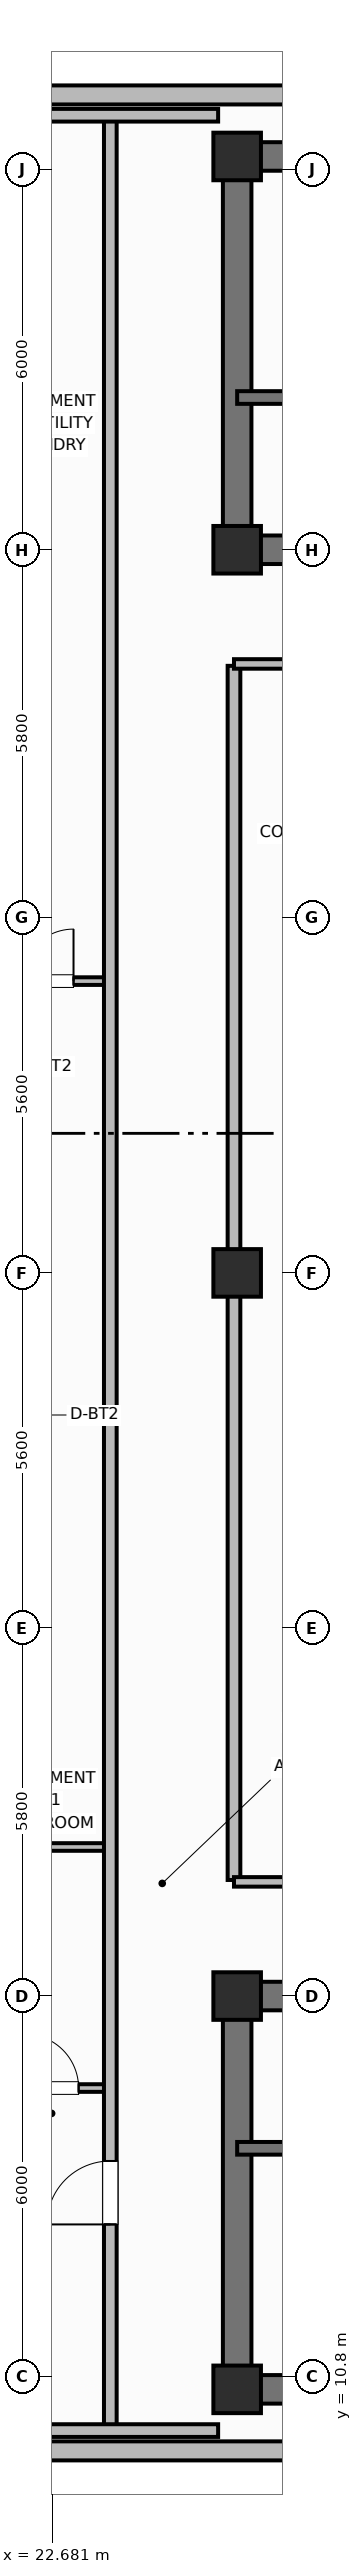
"""IFC4 building model, lengths in metres.
Left out: names, types, materials, properties, quantities, classifications, styles, units other than length and angle.
Written with IfcOpenShell. Run it as: python <this file> out.ifc"""

import sys

from ifc_helpers import new_model, si_unit, direction, frame, frame_2d, origin, origin_2d, place, context, subcontext, project, spatial, rectangle, extrude, element, fill, save


model = new_model("IFC4")
c1 = context("Model", 3, precision=1e-05, world=origin(), true_north=direction((0.0, 1.0)))
c2 = subcontext(c1, "Body", "Model", "MODEL_VIEW")
j1 = project(units=[si_unit("LENGTHUNIT", "METRE"), si_unit("PLANEANGLEUNIT", "RADIAN")], contexts=[c1])
p1 = place(None, origin())
s1 = spatial("IfcSite", under=j1, at=p1, CompositionType="ELEMENT")
p2 = place(p1, origin())
s2 = spatial("IfcBuilding", under=s1, at=p2, CompositionType="ELEMENT")
p3 = place(p2, frame((0.0, 0.0, 278.7)))
s3 = spatial("IfcBuildingStorey", under=s2, at=p3, CompositionType="ELEMENT", Elevation=278.7)
p4 = place(p3, frame((52.8, 10.6, 0.0), z_axis=(0.0, 0.0, 1.0), x_axis=(-1.0, 0.0, 0.0)))
e1 = element("IfcWall", 1, at=p4, inside=s3, PredefinedType="SHEAR", context=c2, shape_type="SweptSolid", body=[
    extrude(rectangle(XDim=27.2, YDim=0.45, at=frame_2d((13.6, 0.0))), origin(), (0.0, 0.0, 1.0), 3.7),
])
p5 = place(p3, frame((25.6, 10.825, 0.0), z_axis=(0.0, 0.0, 1.0), x_axis=(0.0, 1.0, 0.0)))
e2 = element("IfcWall", 2, at=p5, inside=s3, PredefinedType="SHEAR", context=c2, shape_type="SweptSolid", body=[
    extrude(rectangle(XDim=5.75, YDim=0.45, at=frame_2d((2.875, 0.0))), origin(), (0.0, 0.0, 1.0), 3.7),
])
p6 = place(p3, frame((25.6, 16.8, 0.0), z_axis=(0.0, 0.0, 1.0), x_axis=(1.0, 0.0, 0.0)))
e3 = element("IfcWall", 3, at=p6, inside=s3, PredefinedType="SHEAR", context=c2, shape_type="SweptSolid", body=[
    extrude(rectangle(XDim=27.2, YDim=0.45, at=frame_2d((13.6, 0.0))), origin(), (0.0, 0.0, 1.0), 3.7),
])
p7 = place(p6, frame((1.8, 0.0, 0.0)))
e4 = element("IfcOpeningElement", 4, at=p7, cuts=e3, PredefinedType="OPENING", context=c2, shape_type="SweptSolid", body=[
    extrude(rectangle(XDim=1.1, YDim=2.15, at=frame_2d((0.55, 1.075))), frame((0.0, 0.235, 0.0), z_axis=(0.0, -1.0, 0.0), x_axis=(1.0, 0.0, 0.0)), (0.0, 0.0, 1.0), 0.47),
])
p8 = place(p6, frame((5.6, 0.0, 0.0)))
e5 = element("IfcOpeningElement", 5, at=p8, cuts=e3, PredefinedType="OPENING", context=c2, shape_type="SweptSolid", body=[
    extrude(rectangle(XDim=0.85, YDim=2.1, at=frame_2d((0.425, 1.05))), frame((0.0, 0.235, 0.0), z_axis=(0.0, -1.0, 0.0), x_axis=(1.0, 0.0, 0.0)), (0.0, 0.0, 1.0), 0.47),
])
p9 = place(p6, frame((13.0, 0.0, 0.0)))
e6 = element("IfcOpeningElement", 6, at=p9, cuts=e3, PredefinedType="OPENING", context=c2, shape_type="SweptSolid", body=[
    extrude(rectangle(XDim=1.2, YDim=2.15, at=frame_2d((0.6, 1.075))), frame((0.0, 0.235, 0.0), z_axis=(0.0, -1.0, 0.0), x_axis=(1.0, 0.0, 0.0)), (0.0, 0.0, 1.0), 0.47),
])
p10 = place(p6, frame((19.2, 0.0, 0.0)))
e7 = element("IfcOpeningElement", 7, at=p10, cuts=e3, PredefinedType="OPENING", context=c2, shape_type="SweptSolid", body=[
    extrude(rectangle(XDim=0.85, YDim=2.1, at=frame_2d((0.425, 1.05))), frame((0.0, 0.235, 0.0), z_axis=(0.0, -1.0, 0.0), x_axis=(1.0, 0.0, 0.0)), (0.0, 0.0, 1.0), 0.47),
])
p11 = place(p6, frame((23.8, 0.0, 0.0)))
e8 = element("IfcOpeningElement", 8, at=p11, cuts=e3, PredefinedType="OPENING", context=c2, shape_type="SweptSolid", body=[
    extrude(rectangle(XDim=0.9, YDim=2.1, at=frame_2d((0.45, 1.05))), frame((0.0, 0.235, 0.0), z_axis=(0.0, -1.0, 0.0), x_axis=(1.0, 0.0, 0.0)), (0.0, 0.0, 1.0), 0.47),
])
p12 = place(p3, frame((25.6, 45.8, 0.0), z_axis=(0.0, 0.0, 1.0), x_axis=(1.0, 0.0, 0.0)))
e9 = element("IfcWall", 9, at=p12, inside=s3, PredefinedType="SHEAR", context=c2, shape_type="SweptSolid", body=[
    extrude(rectangle(XDim=27.2, YDim=0.45, at=frame_2d((13.6, 0.0))), origin(), (0.0, 0.0, 1.0), 3.7),
])
p13 = place(p3, frame((25.6, 39.825, 0.0), z_axis=(0.0, 0.0, 1.0), x_axis=(0.0, 1.0, 0.0)))
e10 = element("IfcWall", 10, at=p13, inside=s3, PredefinedType="SHEAR", context=c2, shape_type="SweptSolid", body=[
    extrude(rectangle(XDim=5.75, YDim=0.45, at=frame_2d((2.875, 0.0))), origin(), (0.0, 0.0, 1.0), 3.7),
])
p14 = place(p3, frame((52.8, 39.6, 0.0), z_axis=(0.0, 0.0, 1.0), x_axis=(-1.0, 0.0, 0.0)))
e11 = element("IfcWall", 11, at=p14, inside=s3, PredefinedType="SHEAR", context=c2, shape_type="SweptSolid", body=[
    extrude(rectangle(XDim=27.2, YDim=0.45, at=frame_2d((13.6, 0.0))), origin(), (0.0, 0.0, 1.0), 3.7),
])
p15 = place(p14, frame((24.2, 0.0, 0.0)))
e12 = element("IfcOpeningElement", 12, at=p15, cuts=e11, PredefinedType="OPENING", context=c2, shape_type="SweptSolid", body=[
    extrude(rectangle(XDim=1.1, YDim=2.15, at=frame_2d((0.55, 1.075))), frame((0.0, 0.235, 0.0), z_axis=(0.0, -1.0, 0.0), x_axis=(1.0, 0.0, 0.0)), (0.0, 0.0, 1.0), 0.47),
])
p16 = place(p14, frame((20.55, 0.0, 0.0)))
e13 = element("IfcOpeningElement", 13, at=p16, cuts=e11, PredefinedType="OPENING", context=c2, shape_type="SweptSolid", body=[
    extrude(rectangle(XDim=0.95, YDim=2.1, at=frame_2d((0.475, 1.05))), frame((0.0, 0.235, 0.0), z_axis=(0.0, -1.0, 0.0), x_axis=(1.0, 0.0, 0.0)), (0.0, 0.0, 1.0), 0.47),
])
p17 = place(p14, frame((15.1, 0.0, 0.0)))
e14 = element("IfcOpeningElement", 14, at=p17, cuts=e11, PredefinedType="OPENING", context=c2, shape_type="SweptSolid", body=[
    extrude(rectangle(XDim=1.2, YDim=2.15, at=frame_2d((0.6, 1.075))), frame((0.0, 0.235, 0.0), z_axis=(0.0, -1.0, 0.0), x_axis=(1.0, 0.0, 0.0)), (0.0, 0.0, 1.0), 0.47),
])
p18 = place(p14, frame((13.05, 0.0, 0.0)))
e15 = element("IfcOpeningElement", 15, at=p18, cuts=e11, PredefinedType="OPENING", context=c2, shape_type="SweptSolid", body=[
    extrude(rectangle(XDim=0.85, YDim=2.1, at=frame_2d((0.425, 1.05))), frame((0.0, 0.235, 0.0), z_axis=(0.0, -1.0, 0.0), x_axis=(1.0, 0.0, 0.0)), (0.0, 0.0, 1.0), 0.47),
])
p19 = place(p14, frame((11.0, 0.0, 0.0)))
e16 = element("IfcOpeningElement", 16, at=p19, cuts=e11, PredefinedType="OPENING", context=c2, shape_type="SweptSolid", body=[
    extrude(rectangle(XDim=0.85, YDim=2.1, at=frame_2d((0.425, 1.05))), frame((0.0, 0.235, 0.0), z_axis=(0.0, -1.0, 0.0), x_axis=(1.0, 0.0, 0.0)), (0.0, 0.0, 1.0), 0.47),
])
p20 = place(p14, frame((7.35, 0.0, 0.0)))
e17 = element("IfcOpeningElement", 17, at=p20, cuts=e11, PredefinedType="OPENING", context=c2, shape_type="SweptSolid", body=[
    extrude(rectangle(XDim=0.85, YDim=2.1, at=frame_2d((0.425, 1.05))), frame((0.0, 0.235, 0.0), z_axis=(0.0, -1.0, 0.0), x_axis=(1.0, 0.0, 0.0)), (0.0, 0.0, 1.0), 0.47),
])
p21 = place(p14, frame((4.2, 0.0, 0.0)))
e18 = element("IfcOpeningElement", 18, at=p21, cuts=e11, PredefinedType="OPENING", context=c2, shape_type="SweptSolid", body=[
    extrude(rectangle(XDim=1.3, YDim=2.2, at=frame_2d((0.65, 1.1))), frame((0.0, 0.235, 0.0), z_axis=(0.0, -1.0, 0.0), x_axis=(1.0, 0.0, 0.0)), (0.0, 0.0, 1.0), 0.47),
])
for number, where, z_axis, x_axis in (
    (19, (25.6, 10.6, 0.0), (0.0, 0.0, 1.0), (1.0, 0.0, 0.0)),
    (20, (25.6, 16.8, 0.0), (0.0, 0.0, 1.0), (1.0, 0.0, 0.0)),
    (21, (25.6, 39.6, 0.0), (0.0, 0.0, 1.0), (1.0, 0.0, 0.0)),
    (22, (25.6, 45.8, 0.0), (0.0, 0.0, 1.0), (1.0, 0.0, 0.0)),
    (23, (25.6, 28.2, 0.0), (0.0, 0.0, 1.0), (1.0, 0.0, 0.0)),
):
    element("IfcColumn", number, at=place(p3, frame(where, z_axis=z_axis, x_axis=x_axis)), inside=s3, PredefinedType="COLUMN", context=c2, shape_type="SweptSolid", body=[
        extrude(rectangle(XDim=0.75, YDim=0.75, at=origin_2d()), origin(), (0.0, 0.0, 1.0), 3.7),
    ])
p22 = place(p3, frame((22.56, 9.63, 0.0), z_axis=(0.0, 0.0, 1.0), x_axis=(1.0, 0.0, 0.0)))
e24 = element("IfcWall", 24, at=p22, inside=s3, PredefinedType="SOLIDWALL", context=c2, shape_type="SweptSolid", body=[
    extrude(rectangle(XDim=33.28, YDim=0.3, at=frame_2d((16.64, 0.0))), origin(), (0.0, 0.0, 1.0), 2.73),
])
p23 = place(p22, frame((5.08, 0.0, 0.76)))
e25 = element("IfcOpeningElement", 25, at=p23, cuts=e24, PredefinedType="OPENING", context=c2, shape_type="SweptSolid", body=[
    extrude(rectangle(XDim=1.8, YDim=1.85, at=frame_2d((0.9, 0.925))), frame((0.0, 0.16, 0.0), z_axis=(0.0, -1.0, 0.0), x_axis=(1.0, 0.0, 0.0)), (0.0, 0.0, 1.0), 0.32),
])
p24 = place(p22, frame((8.633, 0.0, 0.76)))
e26 = element("IfcOpeningElement", 26, at=p24, cuts=e24, PredefinedType="OPENING", context=c2, shape_type="SweptSolid", body=[
    extrude(rectangle(XDim=1.8, YDim=1.85, at=frame_2d((0.9, 0.925))), frame((0.0, 0.16, 0.0), z_axis=(0.0, -1.0, 0.0), x_axis=(1.0, 0.0, 0.0)), (0.0, 0.0, 1.0), 0.32),
])
p25 = place(p22, frame((15.74, 0.0, 0.76)))
e27 = element("IfcOpeningElement", 27, at=p25, cuts=e24, PredefinedType="OPENING", context=c2, shape_type="SweptSolid", body=[
    extrude(rectangle(XDim=1.8, YDim=1.85, at=frame_2d((0.9, 0.925))), frame((0.0, 0.16, 0.0), z_axis=(0.0, -1.0, 0.0), x_axis=(1.0, 0.0, 0.0)), (0.0, 0.0, 1.0), 0.32),
])
p26 = place(p22, frame((22.847, 0.0, 0.76)))
e28 = element("IfcOpeningElement", 28, at=p26, cuts=e24, PredefinedType="OPENING", context=c2, shape_type="SweptSolid", body=[
    extrude(rectangle(XDim=1.8, YDim=1.85, at=frame_2d((0.9, 0.925))), frame((0.0, 0.16, 0.0), z_axis=(0.0, -1.0, 0.0), x_axis=(1.0, 0.0, 0.0)), (0.0, 0.0, 1.0), 0.32),
])
p27 = place(p22, frame((26.4, 0.0, 0.76)))
e29 = element("IfcOpeningElement", 29, at=p27, cuts=e24, PredefinedType="OPENING", context=c2, shape_type="SweptSolid", body=[
    extrude(rectangle(XDim=1.8, YDim=1.85, at=frame_2d((0.9, 0.925))), frame((0.0, 0.16, 0.0), z_axis=(0.0, -1.0, 0.0), x_axis=(1.0, 0.0, 0.0)), (0.0, 0.0, 1.0), 0.32),
])
p28 = place(p3, frame((55.84, 46.77, 0.0), z_axis=(0.0, 0.0, 1.0), x_axis=(-1.0, 0.0, 0.0)))
e30 = element("IfcWall", 30, at=p28, inside=s3, PredefinedType="SOLIDWALL", context=c2, shape_type="SweptSolid", body=[
    extrude(rectangle(XDim=33.28, YDim=0.3, at=frame_2d((16.64, 0.0))), origin(), (0.0, 0.0, 1.0), 2.73),
])
p29 = place(p28, frame((4.461, 0.0, 0.95)))
e31 = element("IfcOpeningElement", 31, at=p29, cuts=e30, PredefinedType="OPENING", context=c2, shape_type="SweptSolid", body=[
    extrude(rectangle(XDim=1.1, YDim=1.65, at=frame_2d((0.55, 0.825))), frame((0.0, 0.16, 0.0), z_axis=(0.0, -1.0, 0.0), x_axis=(1.0, 0.0, 0.0)), (0.0, 0.0, 1.0), 0.32),
])
p30 = place(p28, frame((7.368, 0.0, 0.95)))
e32 = element("IfcOpeningElement", 32, at=p30, cuts=e30, PredefinedType="OPENING", context=c2, shape_type="SweptSolid", body=[
    extrude(rectangle(XDim=1.1, YDim=1.65, at=frame_2d((0.55, 0.825))), frame((0.0, 0.16, 0.0), z_axis=(0.0, -1.0, 0.0), x_axis=(1.0, 0.0, 0.0)), (0.0, 0.0, 1.0), 0.32),
])
p31 = place(p28, frame((10.275, 0.0, 0.95)))
e33 = element("IfcOpeningElement", 33, at=p31, cuts=e30, PredefinedType="OPENING", context=c2, shape_type="SweptSolid", body=[
    extrude(rectangle(XDim=1.1, YDim=1.65, at=frame_2d((0.55, 0.825))), frame((0.0, 0.16, 0.0), z_axis=(0.0, -1.0, 0.0), x_axis=(1.0, 0.0, 0.0)), (0.0, 0.0, 1.0), 0.32),
])
p32 = place(p28, frame((13.883, 0.0, 0.95)))
e34 = element("IfcOpeningElement", 34, at=p32, cuts=e30, PredefinedType="OPENING", context=c2, shape_type="SweptSolid", body=[
    extrude(rectangle(XDim=1.1, YDim=1.65, at=frame_2d((0.55, 0.825))), frame((0.0, 0.16, 0.0), z_axis=(0.0, -1.0, 0.0), x_axis=(1.0, 0.0, 0.0)), (0.0, 0.0, 1.0), 0.32),
])
p33 = place(p28, frame((16.09, 0.0, 0.95)))
e35 = element("IfcOpeningElement", 35, at=p33, cuts=e30, PredefinedType="OPENING", context=c2, shape_type="SweptSolid", body=[
    extrude(rectangle(XDim=1.1, YDim=1.65, at=frame_2d((0.55, 0.825))), frame((0.0, 0.16, 0.0), z_axis=(0.0, -1.0, 0.0), x_axis=(1.0, 0.0, 0.0)), (0.0, 0.0, 1.0), 0.32),
])
p34 = place(p28, frame((18.297, 0.0, 0.95)))
e36 = element("IfcOpeningElement", 36, at=p34, cuts=e30, PredefinedType="OPENING", context=c2, shape_type="SweptSolid", body=[
    extrude(rectangle(XDim=1.1, YDim=1.65, at=frame_2d((0.55, 0.825))), frame((0.0, 0.16, 0.0), z_axis=(0.0, -1.0, 0.0), x_axis=(1.0, 0.0, 0.0)), (0.0, 0.0, 1.0), 0.32),
])
p35 = place(p28, frame((21.905, 0.0, 0.95)))
e37 = element("IfcOpeningElement", 37, at=p35, cuts=e30, PredefinedType="OPENING", context=c2, shape_type="SweptSolid", body=[
    extrude(rectangle(XDim=1.1, YDim=1.65, at=frame_2d((0.55, 0.825))), frame((0.0, 0.16, 0.0), z_axis=(0.0, -1.0, 0.0), x_axis=(1.0, 0.0, 0.0)), (0.0, 0.0, 1.0), 0.32),
])
p36 = place(p28, frame((24.812, 0.0, 0.95)))
e38 = element("IfcOpeningElement", 38, at=p36, cuts=e30, PredefinedType="OPENING", context=c2, shape_type="SweptSolid", body=[
    extrude(rectangle(XDim=1.1, YDim=1.65, at=frame_2d((0.55, 0.825))), frame((0.0, 0.16, 0.0), z_axis=(0.0, -1.0, 0.0), x_axis=(1.0, 0.0, 0.0)), (0.0, 0.0, 1.0), 0.32),
])
p37 = place(p28, frame((27.719, 0.0, 0.95)))
e39 = element("IfcOpeningElement", 39, at=p37, cuts=e30, PredefinedType="OPENING", context=c2, shape_type="SweptSolid", body=[
    extrude(rectangle(XDim=1.1, YDim=1.65, at=frame_2d((0.55, 0.825))), frame((0.0, 0.16, 0.0), z_axis=(0.0, -1.0, 0.0), x_axis=(1.0, 0.0, 0.0)), (0.0, 0.0, 1.0), 0.32),
])
p38 = place(p3, frame((25.6, 14.4, 0.0), z_axis=(0.0, 0.0, 1.0), x_axis=(1.0, 0.0, 0.0)))
e40 = element("IfcWall", 40, at=p38, inside=s3, PredefinedType="SHEAR", context=c2, shape_type="SweptSolid", body=[
    extrude(rectangle(XDim=9.55, YDim=0.2, at=frame_2d((4.775, 0.0))), origin(), (0.0, 0.0, 1.0), 3.7),
])
p39 = place(p38, frame((1.05, 0.0, 0.0)))
e41 = element("IfcOpeningElement", 41, at=p39, cuts=e40, PredefinedType="OPENING", context=c2, shape_type="SweptSolid", body=[
    extrude(rectangle(XDim=1.1, YDim=2.15, at=frame_2d((0.55, 1.075))), frame((0.0, 0.11, 0.0), z_axis=(0.0, -1.0, 0.0), x_axis=(1.0, 0.0, 0.0)), (0.0, 0.0, 1.0), 0.22),
])
p40 = place(p3, frame((35.15, 42.0, 0.0), z_axis=(0.0, 0.0, 1.0), x_axis=(-1.0, 0.0, 0.0)))
e42 = element("IfcWall", 42, at=p40, inside=s3, PredefinedType="SHEAR", context=c2, shape_type="SweptSolid", body=[
    extrude(rectangle(XDim=9.55, YDim=0.2, at=frame_2d((4.775, 0.0))), origin(), (0.0, 0.0, 1.0), 3.7),
])
p41 = place(p40, frame((7.25, 0.0, 0.0)))
e43 = element("IfcOpeningElement", 43, at=p41, cuts=e42, PredefinedType="OPENING", context=c2, shape_type="SweptSolid", body=[
    extrude(rectangle(XDim=1.1, YDim=2.15, at=frame_2d((0.55, 1.075))), frame((0.0, 0.11, 0.0), z_axis=(0.0, -1.0, 0.0), x_axis=(1.0, 0.0, 0.0)), (0.0, 0.0, 1.0), 0.22),
])
p42 = place(p3, frame((25.55, 18.63, 0.0), z_axis=(0.0, 0.0, 1.0), x_axis=(0.0, 1.0, 0.0)))
e44 = element("IfcWall", 44, at=p42, inside=s3, PredefinedType="PARTITIONING", context=c2, shape_type="SweptSolid", body=[
    extrude(rectangle(XDim=19.14, YDim=0.2, at=frame_2d((9.57, 0.0))), origin(), (0.0, 0.0, 1.0), 2.56),
])
for number, where, z_axis, x_axis in (
    (45, (25.55, 18.6, 0.0), (0.0, 0.0, 1.0), (1.0, 0.0, 0.0)),
    (46, (25.55, 37.8, 0.0), (0.0, 0.0, 1.0), (1.0, 0.0, 0.0)),
):
    element("IfcWall", number, at=place(p3, frame(where, z_axis=z_axis, x_axis=x_axis)), inside=s3, PredefinedType="PARTITIONING", context=c2, shape_type="SweptSolid", body=[
        extrude(rectangle(XDim=3.5, YDim=0.15, at=frame_2d((1.75, 0.0))), origin(), (0.0, 0.0, 1.0), 2.56),
    ])
p43 = place(p3, frame((21.65, 15.35, 0.0), z_axis=(0.0, 0.0, 1.0), x_axis=(1.0, 0.0, 0.0)))
e47 = element("IfcWall", 47, at=p43, inside=s3, PredefinedType="PARTITIONING", context=c2, shape_type="SweptSolid", body=[
    extrude(rectangle(XDim=1.95, YDim=0.12, at=frame_2d((0.975, 0.0))), origin(), (0.0, 0.0, 1.0), 2.56),
])
p44 = place(p43, frame((0.6, 0.0, 0.0)))
e48 = element("IfcOpeningElement", 48, at=p44, cuts=e47, PredefinedType="OPENING", context=c2, shape_type="SweptSolid", body=[
    extrude(rectangle(XDim=0.85, YDim=2.1, at=frame_2d((0.425, 1.05))), frame((0.0, 0.07, 0.0), z_axis=(0.0, -1.0, 0.0), x_axis=(1.0, 0.0, 0.0)), (0.0, 0.0, 1.0), 0.14),
])
p45 = place(p3, frame((21.65, 19.15, 0.0), z_axis=(0.0, 0.0, 1.0), x_axis=(1.0, 0.0, 0.0)))
e49 = element("IfcWall", 49, at=p45, inside=s3, PredefinedType="PARTITIONING", context=c2, shape_type="SweptSolid", body=[
    extrude(rectangle(XDim=1.95, YDim=0.12, at=frame_2d((0.975, 0.0))), origin(), (0.0, 0.0, 1.0), 2.56),
])
p46 = place(p3, frame((21.65, 32.8, 0.0), z_axis=(0.0, 0.0, 1.0), x_axis=(1.0, 0.0, 0.0)))
e50 = element("IfcWall", 50, at=p46, inside=s3, PredefinedType="PARTITIONING", context=c2, shape_type="SweptSolid", body=[
    extrude(rectangle(XDim=1.95, YDim=0.12, at=frame_2d((0.975, 0.0))), origin(), (0.0, 0.0, 1.0), 2.56),
])
p47 = place(p46, frame((0.55, 0.0, 0.0)))
e51 = element("IfcOpeningElement", 51, at=p47, cuts=e50, PredefinedType="OPENING", context=c2, shape_type="SweptSolid", body=[
    extrude(rectangle(XDim=0.82, YDim=2.08, at=frame_2d((0.41, 1.04))), frame((0.0, 0.07, 0.0), z_axis=(0.0, -1.0, 0.0), x_axis=(1.0, 0.0, 0.0)), (0.0, 0.0, 1.0), 0.14),
])
p48 = place(p3, frame((23.6, 9.95, 0.0), z_axis=(0.0, 0.0, 1.0), x_axis=(0.0, 1.0, 0.0)))
e52 = element("IfcWall", 52, at=p48, inside=s3, PredefinedType="PARTITIONING", context=c2, shape_type="SweptSolid", body=[
    extrude(rectangle(XDim=36.5, YDim=0.2, at=frame_2d((18.25, 0.0))), origin(), (0.0, 0.0, 1.0), 2.56),
])
p49 = place(p48, frame((3.25, 0.0, 0.0)))
e53 = element("IfcOpeningElement", 53, at=p49, cuts=e52, PredefinedType="OPENING", context=c2, shape_type="SweptSolid", body=[
    extrude(rectangle(XDim=1.0, YDim=2.15, at=frame_2d((0.5, 1.075))), frame((0.0, 0.11, 0.0), z_axis=(0.0, -1.0, 0.0), x_axis=(1.0, 0.0, 0.0)), (0.0, 0.0, 1.0), 0.22),
])
for number, where, z_axis, x_axis in (
    (54, (21.546, 9.95, 0.0), (0.0, 0.0, 1.0), (1.0, 0.0, 0.0)),
    (55, (21.546, 46.45, 0.0), (0.0, 0.0, 1.0), (1.0, 0.0, 0.0)),
):
    element("IfcWall", number, at=place(p3, frame(where, z_axis=z_axis, x_axis=x_axis)), inside=s3, PredefinedType="PARTITIONING", context=c2, shape_type="SweptSolid", body=[
        extrude(rectangle(XDim=3.754, YDim=0.2, at=frame_2d((1.877, 0.0))), origin(), (0.0, 0.0, 1.0), 2.56),
    ])
p50 = place(p44, origin())
e56 = element("IfcDoor", 56, at=p50, inside=s3, OperationType="SINGLE_SWING_LEFT", PredefinedType="DOOR", context=c2, shape_type="SweptSolid", body=[
    extrude(rectangle(XDim=0.85, YDim=2.1, at=frame_2d((0.425, 1.05))), frame((0.0, 0.025, 0.0), z_axis=(0.0, -1.0, 0.0), x_axis=(1.0, 0.0, 0.0)), (0.0, 0.0, 1.0), 0.05),
])
fill(e48, e56)
p51 = place(p47, origin())
e57 = element("IfcDoor", 57, at=p51, inside=s3, OperationType="SINGLE_SWING_RIGHT", PredefinedType="DOOR", context=c2, shape_type="SweptSolid", body=[
    extrude(rectangle(XDim=0.82, YDim=2.08, at=frame_2d((0.41, 1.04))), frame((0.0, 0.025, 0.0), z_axis=(0.0, -1.0, 0.0), x_axis=(1.0, 0.0, 0.0)), (0.0, 0.0, 1.0), 0.05),
])
fill(e51, e57)
p52 = place(p49, origin())
e58 = element("IfcDoor", 58, at=p52, inside=s3, OperationType="SINGLE_SWING_LEFT", PredefinedType="DOOR", context=c2, shape_type="SweptSolid", body=[
    extrude(rectangle(XDim=1.0, YDim=2.15, at=frame_2d((0.5, 1.075))), frame((0.0, 0.025, 0.0), z_axis=(0.0, -1.0, 0.0), x_axis=(1.0, 0.0, 0.0)), (0.0, 0.0, 1.0), 0.05),
])
fill(e53, e58)
save(model, sys.argv[1])
